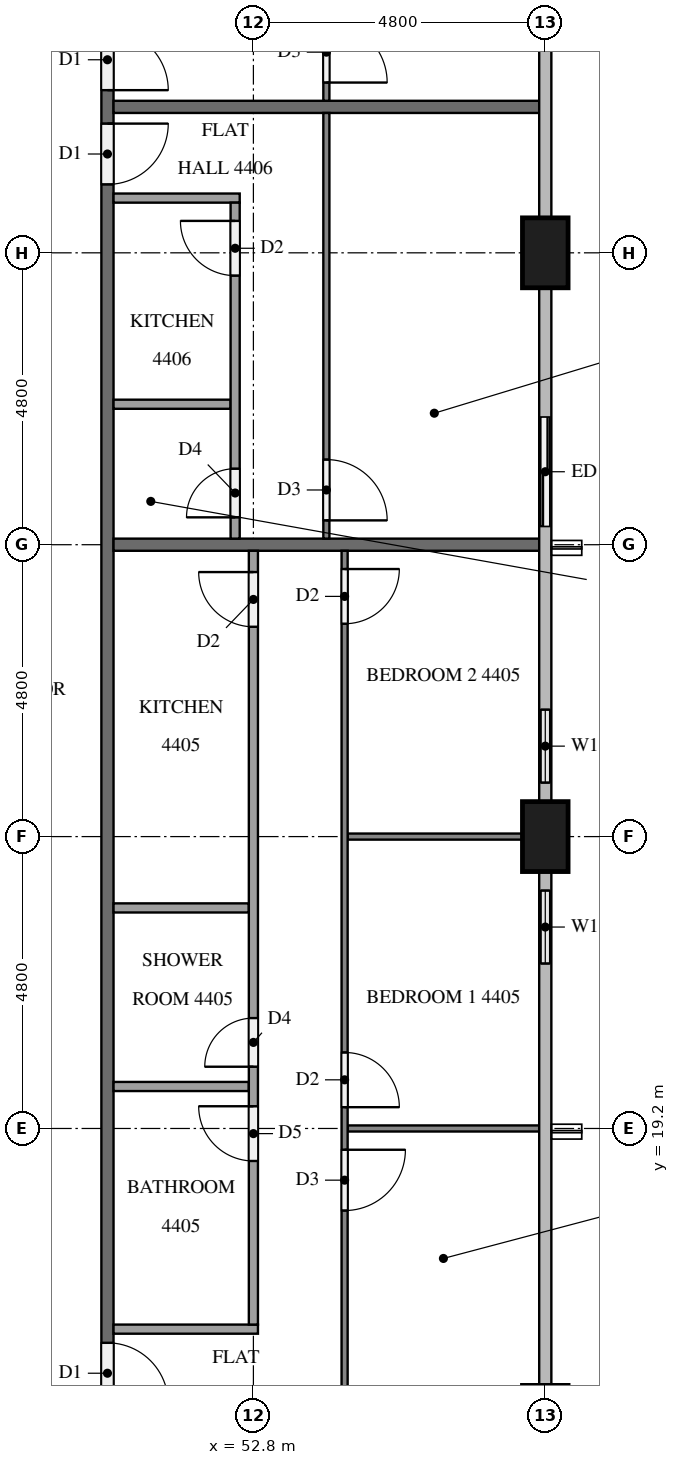
"""IFC4 building model, lengths in metres.
Left out: names, types, materials, properties, quantities, classifications, styles, units other than length and angle.
Written with IfcOpenShell. Run it as: python <this file> out.ifc"""

import sys

from ifc_helpers import new_model, si_unit, direction, frame, frame_2d, origin, origin_2d, place, context, subcontext, project, spatial, rectangle, extrude, element, fill, save


model = new_model("IFC4")
c1 = context("Model", 3, precision=1e-05, world=origin(), true_north=direction((0.0, 1.0)))
c2 = subcontext(c1, "Body", "Model", "MODEL_VIEW")
j1 = project(units=[si_unit("LENGTHUNIT", "METRE"), si_unit("PLANEANGLEUNIT", "RADIAN")], contexts=[c1])
p1 = place(None, origin())
s1 = spatial("IfcSite", under=j1, at=p1, CompositionType="ELEMENT")
p2 = place(p1, origin())
s2 = spatial("IfcBuilding", under=s1, at=p2, CompositionType="ELEMENT")
p3 = place(p2, frame((0.0, 0.0, 170.0)))
s3 = spatial("IfcBuildingStorey", under=s2, at=p3, CompositionType="ELEMENT", Elevation=170.0)
for number, where, z_axis, x_axis in (
    (1, (57.6, 24.0, 0.0), (0.0, 0.0, 1.0), (0.0, 1.0, 0.0)),
    (2, (57.6, 33.6, 0.0), (0.0, 0.0, 1.0), (0.0, 1.0, 0.0)),
):
    element("IfcColumn", number, at=place(p3, frame(where, z_axis=z_axis, x_axis=x_axis)), inside=s3, PredefinedType="COLUMN", context=c2, shape_type="SweptSolid", body=[
        extrude(rectangle(XDim=1.15, YDim=0.75, at=origin_2d()), origin(), (0.0, 0.0, 1.0), 3.1),
    ])
p4 = place(p3, frame((57.6, 21.6, 0.0), z_axis=(0.0, 0.0, 1.0), x_axis=(0.0, 1.0, 0.0)))
e3 = element("IfcWall", 3, at=p4, inside=s3, PredefinedType="SOLIDWALL", context=c2, shape_type="SweptSolid", body=[
    extrude(rectangle(XDim=1.825, YDim=0.15, at=frame_2d((0.913, 0.0))), origin(), (0.0, 0.0, 1.0), 3.1),
])
p5 = place(p4, frame((0.312, 0.0, 0.9)))
e4 = element("IfcOpeningElement", 4, at=p5, cuts=e3, PredefinedType="OPENING", context=c2, shape_type="SweptSolid", body=[
    extrude(rectangle(XDim=1.2, YDim=1.4, at=frame_2d((0.6, 0.7))), frame((0.0, 0.085, 0.0), z_axis=(0.0, -1.0, 0.0), x_axis=(1.0, 0.0, 0.0)), (0.0, 0.0, 1.0), 0.17),
])
p6 = place(p3, frame((57.6, 24.575, 0.0), z_axis=(0.0, 0.0, 1.0), x_axis=(0.0, 1.0, 0.0)))
e5 = element("IfcWall", 5, at=p6, inside=s3, PredefinedType="SOLIDWALL", context=c2, shape_type="SweptSolid", body=[
    extrude(rectangle(XDim=1.825, YDim=0.15, at=frame_2d((0.913, 0.0))), origin(), (0.0, 0.0, 1.0), 3.1),
])
p7 = place(p6, frame((0.312, 0.0, 0.9)))
e6 = element("IfcOpeningElement", 6, at=p7, cuts=e5, PredefinedType="OPENING", context=c2, shape_type="SweptSolid", body=[
    extrude(rectangle(XDim=1.2, YDim=1.4, at=frame_2d((0.6, 0.7))), frame((0.0, 0.085, 0.0), z_axis=(0.0, -1.0, 0.0), x_axis=(1.0, 0.0, 0.0)), (0.0, 0.0, 1.0), 0.17),
])
p8 = place(p3, frame((57.6, 28.8, 0.0), z_axis=(0.0, 0.0, 1.0), x_axis=(0.0, 1.0, 0.0)))
e7 = element("IfcWall", 7, at=p8, inside=s3, PredefinedType="SOLIDWALL", context=c2, shape_type="SweptSolid", body=[
    extrude(rectangle(XDim=2.4, YDim=0.15, at=frame_2d((1.2, 0.0))), origin(), (0.0, 0.0, 1.0), 3.1),
])
p9 = place(p8, frame((0.3, 0.0, 0.0)))
e8 = element("IfcOpeningElement", 8, at=p9, cuts=e7, PredefinedType="OPENING", context=c2, shape_type="SweptSolid", body=[
    extrude(rectangle(XDim=1.8, YDim=2.4, at=frame_2d((0.9, 1.2))), frame((0.0, 0.085, 0.0), z_axis=(0.0, -1.0, 0.0), x_axis=(1.0, 0.0, 0.0)), (0.0, 0.0, 1.0), 0.17),
])
p10 = place(p3, frame((50.4, 40.7, 0.0), z_axis=(0.0, 0.0, 1.0), x_axis=(0.0, -1.0, 0.0)))
e9 = element("IfcWall", 9, at=p10, inside=s3, PredefinedType="PARTITIONING", context=c2, shape_type="SweptSolid", body=[
    extrude(rectangle(XDim=28.6, YDim=0.2, at=frame_2d((14.3, 0.0))), origin(), (0.0, 0.0, 1.0), 3.1),
])
p11 = place(p10, frame((26.575, 0.0, 0.0)))
e10 = element("IfcOpeningElement", 10, at=p11, cuts=e9, PredefinedType="OPENING", context=c2, shape_type="SweptSolid", body=[
    extrude(rectangle(XDim=1.0, YDim=2.1, at=frame_2d((0.5, 1.05))), frame((0.0, 0.11, 0.0), z_axis=(0.0, -1.0, 0.0), x_axis=(1.0, 0.0, 0.0)), (0.0, 0.0, 1.0), 0.22),
])
p12 = place(p10, frame((25.025, 0.0, 0.0)))
e11 = element("IfcOpeningElement", 11, at=p12, cuts=e9, PredefinedType="OPENING", context=c2, shape_type="SweptSolid", body=[
    extrude(rectangle(XDim=1.0, YDim=2.1, at=frame_2d((0.5, 1.05))), frame((0.0, 0.11, 0.0), z_axis=(0.0, -1.0, 0.0), x_axis=(1.0, 0.0, 0.0)), (0.0, 0.0, 1.0), 0.22),
])
p13 = place(p10, frame((4.975, 0.0, 0.0)))
e12 = element("IfcOpeningElement", 12, at=p13, cuts=e9, PredefinedType="OPENING", context=c2, shape_type="SweptSolid", body=[
    extrude(rectangle(XDim=1.0, YDim=2.1, at=frame_2d((0.5, 1.05))), frame((0.0, 0.11, 0.0), z_axis=(0.0, -1.0, 0.0), x_axis=(1.0, 0.0, 0.0)), (0.0, 0.0, 1.0), 0.22),
])
p14 = place(p10, frame((3.425, 0.0, 0.0)))
e13 = element("IfcOpeningElement", 13, at=p14, cuts=e9, PredefinedType="OPENING", context=c2, shape_type="SweptSolid", body=[
    extrude(rectangle(XDim=1.0, YDim=2.1, at=frame_2d((0.5, 1.05))), frame((0.0, 0.11, 0.0), z_axis=(0.0, -1.0, 0.0), x_axis=(1.0, 0.0, 0.0)), (0.0, 0.0, 1.0), 0.22),
])
for number, where, z_axis, x_axis in (
    (14, (50.5, 28.8, 0.0), (0.0, 0.0, 1.0), (1.0, 0.0, 0.0)),
    (15, (50.5, 36.0, 0.0), (0.0, 0.0, 1.0), (1.0, 0.0, 0.0)),
):
    element("IfcWall", number, at=place(p3, frame(where, z_axis=z_axis, x_axis=x_axis)), inside=s3, PredefinedType="PARTITIONING", context=c2, shape_type="SweptSolid", body=[
        extrude(rectangle(XDim=7.0, YDim=0.2, at=frame_2d((3.5, 0.0))), origin(), (0.0, 0.0, 1.0), 3.1),
    ])
p15 = place(p3, frame((54.35, 19.2, 0.0), z_axis=(0.0, 0.0, 1.0), x_axis=(1.0, 0.0, 0.0)))
e16 = element("IfcWall", 16, at=p15, inside=s3, PredefinedType="PARTITIONING", context=c2, shape_type="SweptSolid", body=[
    extrude(rectangle(XDim=3.15, YDim=0.1, at=frame_2d((1.575, 0.0))), origin(), (0.0, 0.0, 1.0), 3.1),
])
p16 = place(p3, frame((54.35, 24.0, 0.0), z_axis=(0.0, 0.0, 1.0), x_axis=(1.0, 0.0, 0.0)))
e17 = element("IfcWall", 17, at=p16, inside=s3, PredefinedType="PARTITIONING", context=c2, shape_type="SweptSolid", body=[
    extrude(rectangle(XDim=2.875, YDim=0.1, at=frame_2d((1.438, 0.0))), origin(), (0.0, 0.0, 1.0), 3.1),
])
p17 = place(p3, frame((54.3, 28.7, 0.0), z_axis=(0.0, 0.0, 1.0), x_axis=(0.0, -1.0, 0.0)))
e18 = element("IfcWall", 18, at=p17, inside=s3, PredefinedType="PARTITIONING", context=c2, shape_type="SweptSolid", body=[
    extrude(rectangle(XDim=14.2, YDim=0.1, at=frame_2d((7.1, 0.0))), origin(), (0.0, 0.0, 1.0), 3.1),
])
p18 = place(p17, frame((9.85, 0.0, 0.0)))
e19 = element("IfcOpeningElement", 19, at=p18, cuts=e18, PredefinedType="OPENING", context=c2, shape_type="SweptSolid", body=[
    extrude(rectangle(XDim=1.0, YDim=2.1, at=frame_2d((0.5, 1.05))), frame((0.0, 0.06, 0.0), z_axis=(0.0, -1.0, 0.0), x_axis=(1.0, 0.0, 0.0)), (0.0, 0.0, 1.0), 0.12),
])
p19 = place(p17, frame((8.25, 0.0, 0.0)))
e20 = element("IfcOpeningElement", 20, at=p19, cuts=e18, PredefinedType="OPENING", context=c2, shape_type="SweptSolid", body=[
    extrude(rectangle(XDim=0.9, YDim=2.1, at=frame_2d((0.45, 1.05))), frame((0.0, 0.06, 0.0), z_axis=(0.0, -1.0, 0.0), x_axis=(1.0, 0.0, 0.0)), (0.0, 0.0, 1.0), 0.12),
])
p20 = place(p17, frame((0.3, 0.0, 0.0)))
e21 = element("IfcOpeningElement", 21, at=p20, cuts=e18, PredefinedType="OPENING", context=c2, shape_type="SweptSolid", body=[
    extrude(rectangle(XDim=0.9, YDim=2.1, at=frame_2d((0.45, 1.05))), frame((0.0, 0.06, 0.0), z_axis=(0.0, -1.0, 0.0), x_axis=(1.0, 0.0, 0.0)), (0.0, 0.0, 1.0), 0.12),
])
for number, where, z_axis, x_axis in (
    (22, (50.5, 19.89, 0.0), (0.0, 0.0, 1.0), (1.0, 0.0, 0.0)),
    (23, (50.5, 22.827, 0.0), (0.0, 0.0, 1.0), (1.0, 0.0, 0.0)),
):
    element("IfcWall", number, at=place(p3, frame(where, z_axis=z_axis, x_axis=x_axis)), inside=s3, PredefinedType="PARTITIONING", context=c2, shape_type="SweptSolid", body=[
        extrude(rectangle(XDim=2.225, YDim=0.15, at=frame_2d((1.113, 0.0))), origin(), (0.0, 0.0, 1.0), 3.1),
    ])
p21 = place(p3, frame((50.5, 15.9, 0.0), z_axis=(0.0, 0.0, 1.0), x_axis=(1.0, 0.0, 0.0)))
e24 = element("IfcWall", 24, at=p21, inside=s3, PredefinedType="PARTITIONING", context=c2, shape_type="SweptSolid", body=[
    extrude(rectangle(XDim=2.375, YDim=0.15, at=frame_2d((1.188, 0.0))), origin(), (0.0, 0.0, 1.0), 3.1),
])
p22 = place(p3, frame((52.8, 15.975, 0.0), z_axis=(0.0, 0.0, 1.0), x_axis=(0.0, 1.0, 0.0)))
e25 = element("IfcWall", 25, at=p22, inside=s3, PredefinedType="PARTITIONING", context=c2, shape_type="SweptSolid", body=[
    extrude(rectangle(XDim=12.725, YDim=0.15, at=frame_2d((6.362, 0.0))), origin(), (0.0, 0.0, 1.0), 3.1),
])
p23 = place(p22, frame((2.69, 0.0, 0.0)))
e26 = element("IfcOpeningElement", 26, at=p23, cuts=e25, PredefinedType="OPENING", context=c2, shape_type="SweptSolid", body=[
    extrude(rectangle(XDim=0.9, YDim=2.1, at=frame_2d((0.45, 1.05))), frame((0.0, 0.085, 0.0), z_axis=(0.0, -1.0, 0.0), x_axis=(1.0, 0.0, 0.0)), (0.0, 0.0, 1.0), 0.17),
])
p24 = place(p22, frame((4.24, 0.0, 0.0)))
e27 = element("IfcOpeningElement", 27, at=p24, cuts=e25, PredefinedType="OPENING", context=c2, shape_type="SweptSolid", body=[
    extrude(rectangle(XDim=0.8, YDim=2.1, at=frame_2d((0.4, 1.05))), frame((0.0, 0.085, 0.0), z_axis=(0.0, -1.0, 0.0), x_axis=(1.0, 0.0, 0.0)), (0.0, 0.0, 1.0), 0.17),
])
p25 = place(p22, frame((11.475, 0.0, 0.0)))
e28 = element("IfcOpeningElement", 28, at=p25, cuts=e25, PredefinedType="OPENING", context=c2, shape_type="SweptSolid", body=[
    extrude(rectangle(XDim=0.9, YDim=2.1, at=frame_2d((0.45, 1.05))), frame((0.0, 0.085, 0.0), z_axis=(0.0, -1.0, 0.0), x_axis=(1.0, 0.0, 0.0)), (0.0, 0.0, 1.0), 0.17),
])
p26 = place(p3, frame((54.0, 35.9, 0.0), z_axis=(0.0, 0.0, 1.0), x_axis=(0.0, -1.0, 0.0)))
e29 = element("IfcWall", 29, at=p26, inside=s3, PredefinedType="PARTITIONING", context=c2, shape_type="SweptSolid", body=[
    extrude(rectangle(XDim=7.0, YDim=0.1, at=frame_2d((3.5, 0.0))), origin(), (0.0, 0.0, 1.0), 3.1),
])
p27 = place(p26, frame((5.7, 0.0, 0.0)))
e30 = element("IfcOpeningElement", 30, at=p27, cuts=e29, PredefinedType="OPENING", context=c2, shape_type="SweptSolid", body=[
    extrude(rectangle(XDim=1.0, YDim=2.1, at=frame_2d((0.5, 1.05))), frame((0.0, 0.06, 0.0), z_axis=(0.0, -1.0, 0.0), x_axis=(1.0, 0.0, 0.0)), (0.0, 0.0, 1.0), 0.12),
])
p28 = place(p3, frame((50.5, 31.11, 0.0), z_axis=(0.0, 0.0, 1.0), x_axis=(1.0, 0.0, 0.0)))
e31 = element("IfcWall", 31, at=p28, inside=s3, PredefinedType="PARTITIONING", context=c2, shape_type="SweptSolid", body=[
    extrude(rectangle(XDim=1.925, YDim=0.15, at=frame_2d((0.962, 0.0))), origin(), (0.0, 0.0, 1.0), 3.1),
])
p29 = place(p3, frame((50.5, 34.5, 0.0), z_axis=(0.0, 0.0, 1.0), x_axis=(1.0, 0.0, 0.0)))
e32 = element("IfcWall", 32, at=p29, inside=s3, PredefinedType="PARTITIONING", context=c2, shape_type="SweptSolid", body=[
    extrude(rectangle(XDim=2.075, YDim=0.15, at=frame_2d((1.038, 0.0))), origin(), (0.0, 0.0, 1.0), 3.1),
])
p30 = place(p3, frame((52.5, 28.9, 0.0), z_axis=(0.0, 0.0, 1.0), x_axis=(0.0, 1.0, 0.0)))
e33 = element("IfcWall", 33, at=p30, inside=s3, PredefinedType="PARTITIONING", context=c2, shape_type="SweptSolid", body=[
    extrude(rectangle(XDim=5.525, YDim=0.15, at=frame_2d((2.763, 0.0))), origin(), (0.0, 0.0, 1.0), 3.1),
])
p31 = place(p30, frame((4.325, 0.0, 0.0)))
e34 = element("IfcOpeningElement", 34, at=p31, cuts=e33, PredefinedType="OPENING", context=c2, shape_type="SweptSolid", body=[
    extrude(rectangle(XDim=0.9, YDim=2.1, at=frame_2d((0.45, 1.05))), frame((0.0, 0.085, 0.0), z_axis=(0.0, -1.0, 0.0), x_axis=(1.0, 0.0, 0.0)), (0.0, 0.0, 1.0), 0.17),
])
p32 = place(p30, frame((0.35, 0.0, 0.0)))
e35 = element("IfcOpeningElement", 35, at=p32, cuts=e33, PredefinedType="OPENING", context=c2, shape_type="SweptSolid", body=[
    extrude(rectangle(XDim=0.8, YDim=2.1, at=frame_2d((0.4, 1.05))), frame((0.0, 0.085, 0.0), z_axis=(0.0, -1.0, 0.0), x_axis=(1.0, 0.0, 0.0)), (0.0, 0.0, 1.0), 0.17),
])
p33 = place(p3, frame((54.0, 47.579, 0.0), z_axis=(0.0, 0.0, 1.0), x_axis=(0.0, -1.0, 0.0)))
e36 = element("IfcWall", 36, at=p33, inside=s3, PredefinedType="PARTITIONING", context=c2, shape_type="SweptSolid", body=[
    extrude(rectangle(XDim=11.479, YDim=0.1, at=frame_2d((5.739, 0.0))), origin(), (0.0, 0.0, 1.0), 3.1),
])
p34 = place(p33, frame((10.178, 0.0, 0.0)))
e37 = element("IfcOpeningElement", 37, at=p34, cuts=e36, PredefinedType="OPENING", context=c2, shape_type="SweptSolid", body=[
    extrude(rectangle(XDim=1.0, YDim=2.1, at=frame_2d((0.5, 1.05))), frame((0.0, 0.06, 0.0), z_axis=(0.0, -1.0, 0.0), x_axis=(1.0, 0.0, 0.0)), (0.0, 0.0, 1.0), 0.12),
])
p35 = place(p33, frame((0.3, 0.0, 0.0)))
e38 = element("IfcOpeningElement", 38, at=p35, cuts=e36, PredefinedType="OPENING", context=c2, shape_type="SweptSolid", body=[
    extrude(rectangle(XDim=0.9, YDim=2.1, at=frame_2d((0.45, 1.05))), frame((0.0, 0.06, 0.0), z_axis=(0.0, -1.0, 0.0), x_axis=(1.0, 0.0, 0.0)), (0.0, 0.0, 1.0), 0.12),
])
p36 = place(p5, origin())
e39 = element("IfcWindow", 39, at=p36, inside=s3, PartitioningType="SINGLE_PANEL", PredefinedType="WINDOW", context=c2, shape_type="SweptSolid", body=[
    extrude(rectangle(XDim=1.2, YDim=1.4, at=frame_2d((0.6, 0.7))), frame((0.0, 0.03, 0.0), z_axis=(0.0, -1.0, 0.0), x_axis=(1.0, 0.0, 0.0)), (0.0, 0.0, 1.0), 0.06),
])
fill(e4, e39)
p37 = place(p7, origin())
e40 = element("IfcWindow", 40, at=p37, inside=s3, PartitioningType="SINGLE_PANEL", PredefinedType="WINDOW", context=c2, shape_type="SweptSolid", body=[
    extrude(rectangle(XDim=1.2, YDim=1.4, at=frame_2d((0.6, 0.7))), frame((0.0, 0.03, 0.0), z_axis=(0.0, -1.0, 0.0), x_axis=(1.0, 0.0, 0.0)), (0.0, 0.0, 1.0), 0.06),
])
fill(e6, e40)
p38 = place(p9, origin())
e41 = element("IfcDoor", 41, at=p38, inside=s3, OperationType="SLIDING_TO_RIGHT", PredefinedType="DOOR", context=c2, shape_type="SweptSolid", body=[
    extrude(rectangle(XDim=1.8, YDim=2.4, at=frame_2d((0.9, 1.2))), frame((0.0, 0.025, 0.0), z_axis=(0.0, -1.0, 0.0), x_axis=(1.0, 0.0, 0.0)), (0.0, 0.0, 1.0), 0.05),
])
fill(e8, e41)
p39 = place(p12, origin())
e42 = element("IfcDoor", 42, at=p39, inside=s3, OperationType="SINGLE_SWING_RIGHT", PredefinedType="DOOR", context=c2, shape_type="SweptSolid", body=[
    extrude(rectangle(XDim=1.0, YDim=2.1, at=frame_2d((0.5, 1.05))), frame((0.0, 0.025, 0.0), z_axis=(0.0, -1.0, 0.0), x_axis=(1.0, 0.0, 0.0)), (0.0, 0.0, 1.0), 0.05),
])
fill(e11, e42)
p40 = place(p13, origin())
e43 = element("IfcDoor", 43, at=p40, inside=s3, OperationType="SINGLE_SWING_LEFT", PredefinedType="DOOR", context=c2, shape_type="SweptSolid", body=[
    extrude(rectangle(XDim=1.0, YDim=2.1, at=frame_2d((0.5, 1.05))), frame((0.0, 0.025, 0.0), z_axis=(0.0, -1.0, 0.0), x_axis=(1.0, 0.0, 0.0)), (0.0, 0.0, 1.0), 0.05),
])
fill(e12, e43)
p41 = place(p14, origin())
e44 = element("IfcDoor", 44, at=p41, inside=s3, OperationType="SINGLE_SWING_RIGHT", PredefinedType="DOOR", context=c2, shape_type="SweptSolid", body=[
    extrude(rectangle(XDim=1.0, YDim=2.1, at=frame_2d((0.5, 1.05))), frame((0.0, 0.025, 0.0), z_axis=(0.0, -1.0, 0.0), x_axis=(1.0, 0.0, 0.0)), (0.0, 0.0, 1.0), 0.05),
])
fill(e13, e44)
p42 = place(p18, origin())
e45 = element("IfcDoor", 45, at=p42, inside=s3, OperationType="SINGLE_SWING_LEFT", PredefinedType="DOOR", context=c2, shape_type="SweptSolid", body=[
    extrude(rectangle(XDim=1.0, YDim=2.1, at=frame_2d((0.5, 1.05))), frame((0.0, 0.025, 0.0), z_axis=(0.0, -1.0, 0.0), x_axis=(1.0, 0.0, 0.0)), (0.0, 0.0, 1.0), 0.05),
])
fill(e19, e45)
p43 = place(p19, origin())
e46 = element("IfcDoor", 46, at=p43, inside=s3, OperationType="SINGLE_SWING_RIGHT", PredefinedType="DOOR", context=c2, shape_type="SweptSolid", body=[
    extrude(rectangle(XDim=0.9, YDim=2.1, at=frame_2d((0.45, 1.05))), frame((0.0, 0.025, 0.0), z_axis=(0.0, -1.0, 0.0), x_axis=(1.0, 0.0, 0.0)), (0.0, 0.0, 1.0), 0.05),
])
fill(e20, e46)
p44 = place(p20, origin())
e47 = element("IfcDoor", 47, at=p44, inside=s3, OperationType="SINGLE_SWING_LEFT", PredefinedType="DOOR", context=c2, shape_type="SweptSolid", body=[
    extrude(rectangle(XDim=0.9, YDim=2.1, at=frame_2d((0.45, 1.05))), frame((0.0, 0.025, 0.0), z_axis=(0.0, -1.0, 0.0), x_axis=(1.0, 0.0, 0.0)), (0.0, 0.0, 1.0), 0.05),
])
fill(e21, e47)
p45 = place(p23, origin())
e48 = element("IfcDoor", 48, at=p45, inside=s3, OperationType="SINGLE_SWING_RIGHT", PredefinedType="DOOR", context=c2, shape_type="SweptSolid", body=[
    extrude(rectangle(XDim=0.9, YDim=2.1, at=frame_2d((0.45, 1.05))), frame((0.0, 0.025, 0.0), z_axis=(0.0, -1.0, 0.0), x_axis=(1.0, 0.0, 0.0)), (0.0, 0.0, 1.0), 0.05),
])
fill(e26, e48)
p46 = place(p24, origin())
e49 = element("IfcDoor", 49, at=p46, inside=s3, OperationType="SINGLE_SWING_LEFT", PredefinedType="DOOR", context=c2, shape_type="SweptSolid", body=[
    extrude(rectangle(XDim=0.8, YDim=2.1, at=frame_2d((0.4, 1.05))), frame((0.0, 0.025, 0.0), z_axis=(0.0, -1.0, 0.0), x_axis=(1.0, 0.0, 0.0)), (0.0, 0.0, 1.0), 0.05),
])
fill(e27, e49)
p47 = place(p25, origin())
e50 = element("IfcDoor", 50, at=p47, inside=s3, OperationType="SINGLE_SWING_RIGHT", PredefinedType="DOOR", context=c2, shape_type="SweptSolid", body=[
    extrude(rectangle(XDim=0.9, YDim=2.1, at=frame_2d((0.45, 1.05))), frame((0.0, 0.025, 0.0), z_axis=(0.0, -1.0, 0.0), x_axis=(1.0, 0.0, 0.0)), (0.0, 0.0, 1.0), 0.05),
])
fill(e28, e50)
p48 = place(p27, origin())
e51 = element("IfcDoor", 51, at=p48, inside=s3, OperationType="SINGLE_SWING_RIGHT", PredefinedType="DOOR", context=c2, shape_type="SweptSolid", body=[
    extrude(rectangle(XDim=1.0, YDim=2.1, at=frame_2d((0.5, 1.05))), frame((0.0, 0.025, 0.0), z_axis=(0.0, -1.0, 0.0), x_axis=(1.0, 0.0, 0.0)), (0.0, 0.0, 1.0), 0.05),
])
fill(e30, e51)
p49 = place(p31, origin())
e52 = element("IfcDoor", 52, at=p49, inside=s3, OperationType="SINGLE_SWING_RIGHT", PredefinedType="DOOR", context=c2, shape_type="SweptSolid", body=[
    extrude(rectangle(XDim=0.9, YDim=2.1, at=frame_2d((0.45, 1.05))), frame((0.0, 0.025, 0.0), z_axis=(0.0, -1.0, 0.0), x_axis=(1.0, 0.0, 0.0)), (0.0, 0.0, 1.0), 0.05),
])
fill(e34, e52)
p50 = place(p32, origin())
e53 = element("IfcDoor", 53, at=p50, inside=s3, OperationType="SINGLE_SWING_LEFT", PredefinedType="DOOR", context=c2, shape_type="SweptSolid", body=[
    extrude(rectangle(XDim=0.8, YDim=2.1, at=frame_2d((0.4, 1.05))), frame((0.0, 0.025, 0.0), z_axis=(0.0, -1.0, 0.0), x_axis=(1.0, 0.0, 0.0)), (0.0, 0.0, 1.0), 0.05),
])
fill(e35, e53)
p51 = place(p34, origin())
e54 = element("IfcDoor", 54, at=p51, inside=s3, OperationType="SINGLE_SWING_RIGHT", PredefinedType="DOOR", context=c2, shape_type="SweptSolid", body=[
    extrude(rectangle(XDim=1.0, YDim=2.1, at=frame_2d((0.5, 1.05))), frame((0.0, 0.025, 0.0), z_axis=(0.0, -1.0, 0.0), x_axis=(1.0, 0.0, 0.0)), (0.0, 0.0, 1.0), 0.05),
])
fill(e37, e54)
save(model, sys.argv[1])
